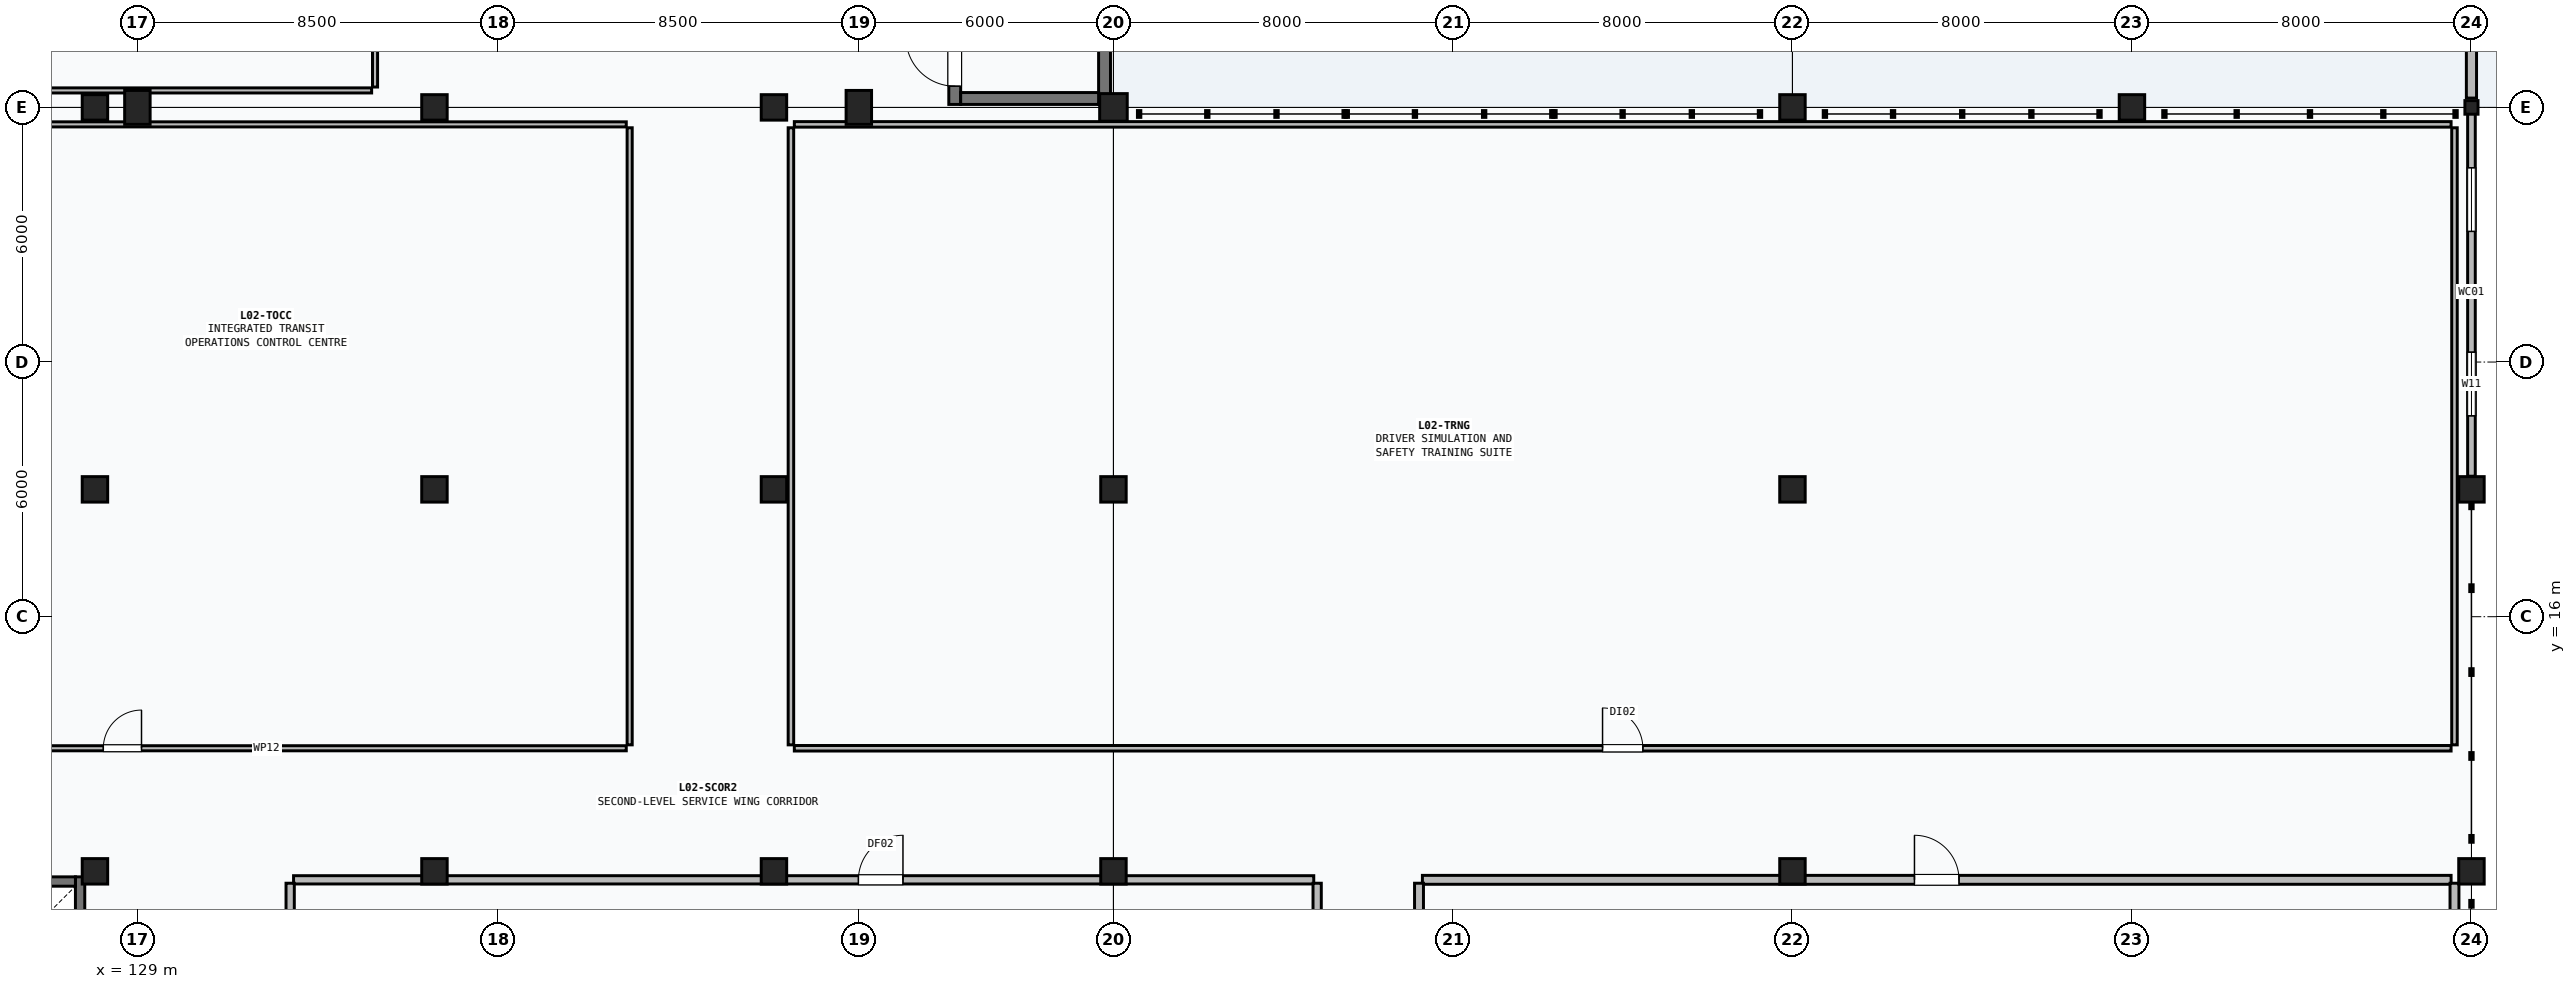
"""IFC4 building model, lengths in metres.
Left out: names, types, materials, properties, quantities, classifications, styles, units other than length and angle.
Written with IfcOpenShell. Run it as: python <this file> out.ifc"""

import sys

from ifc_helpers import new_model, si_unit, direction, frame, frame_2d, origin, origin_2d, place, context, subcontext, project, spatial, polyline, rectangle, i_section, outline, extrude, element, fill, save


model = new_model("IFC4")
c1 = context("Model", 3, precision=1e-05, world=origin(), true_north=direction((0.0, 1.0)))
c2 = subcontext(c1, "Body", "Model", "MODEL_VIEW")
j1 = project(units=[si_unit("LENGTHUNIT", "METRE"), si_unit("PLANEANGLEUNIT", "RADIAN")], contexts=[c1])
p1 = place(None, origin())
s1 = spatial("IfcSite", under=j1, at=p1, CompositionType="ELEMENT")
p2 = place(p1, origin())
s2 = spatial("IfcBuilding", under=s1, at=p2, CompositionType="ELEMENT")
p3 = place(p2, frame((0.0, 0.0, 8.4)))
s3 = spatial("IfcBuildingStorey", under=s2, at=p3, CompositionType="ELEMENT", Elevation=8.4)
for number, where, z_axis, x_axis in (
    (1, (129.0, 28.0, 0.0), (0.0, 0.0, 1.0), (1.0, 0.0, 0.0)),
    (2, (146.0, 28.0, 0.0), (0.0, 0.0, 1.0), (1.0, 0.0, 0.0)),
):
    element("IfcColumn", number, at=place(p3, frame(where, z_axis=z_axis, x_axis=x_axis)), inside=s3, PredefinedType="COLUMN", context=c2, shape_type="SweptSolid", body=[
        extrude(rectangle(XDim=0.6, YDim=0.8, at=origin_2d()), origin(), (0.0, 0.0, 1.0), 3.6),
    ])
p4 = place(p3, frame((152.0, 28.0, 0.0), z_axis=(0.0, 0.0, 1.0), x_axis=(1.0, 0.0, 0.0)))
e3 = element("IfcColumn", 3, at=p4, inside=s3, PredefinedType="COLUMN", context=c2, shape_type="SweptSolid", body=[
    extrude(rectangle(XDim=0.65, YDim=0.65, at=origin_2d()), origin(), (0.0, 0.0, 1.0), 3.6),
])
for number, where, z_axis, x_axis in (
    (4, (128.0, 10.0, 0.0), (0.0, 0.0, 1.0), (1.0, 0.0, 0.0)),
    (5, (128.0, 19.0, 0.0), (0.0, 0.0, 1.0), (1.0, 0.0, 0.0)),
    (6, (128.0, 28.0, 0.0), (0.0, 0.0, 1.0), (1.0, 0.0, 0.0)),
    (7, (136.0, 10.0, 0.0), (0.0, 0.0, 1.0), (1.0, 0.0, 0.0)),
    (8, (136.0, 19.0, 0.0), (0.0, 0.0, 1.0), (1.0, 0.0, 0.0)),
    (9, (136.0, 28.0, 0.0), (0.0, 0.0, 1.0), (1.0, 0.0, 0.0)),
    (10, (144.0, 10.0, 0.0), (0.0, 0.0, 1.0), (1.0, 0.0, 0.0)),
    (11, (144.0, 19.0, 0.0), (0.0, 0.0, 1.0), (1.0, 0.0, 0.0)),
    (12, (144.0, 28.0, 0.0), (0.0, 0.0, 1.0), (1.0, 0.0, 0.0)),
    (13, (152.0, 10.0, 0.0), (0.0, 0.0, 1.0), (1.0, 0.0, 0.0)),
    (14, (152.0, 19.0, 0.0), (0.0, 0.0, 1.0), (1.0, 0.0, 0.0)),
    (15, (168.0, 10.0, 0.0), (0.0, 0.0, 1.0), (1.0, 0.0, 0.0)),
    (16, (168.0, 19.0, 0.0), (0.0, 0.0, 1.0), (1.0, 0.0, 0.0)),
    (17, (168.0, 28.0, 0.0), (0.0, 0.0, 1.0), (1.0, 0.0, 0.0)),
    (18, (176.0, 28.0, 0.0), (0.0, 0.0, 1.0), (1.0, 0.0, 0.0)),
    (19, (184.0, 10.0, 0.0), (0.0, 0.0, 1.0), (1.0, 0.0, 0.0)),
    (20, (184.0, 19.0, 0.0), (0.0, 0.0, 1.0), (1.0, 0.0, 0.0)),
):
    element("IfcColumn", number, at=place(p3, frame(where, z_axis=z_axis, x_axis=x_axis)), inside=s3, PredefinedType="COLUMN", context=c2, shape_type="SweptSolid", body=[
        extrude(rectangle(XDim=0.6, YDim=0.6, at=origin_2d()), origin(), (0.0, 0.0, 1.0), 3.6),
    ])
p5 = place(p3, frame((184.0, 28.0, 0.0), z_axis=(0.0, 0.0, 1.0), x_axis=(1.0, 0.0, 0.0)))
e21 = element("IfcColumn", 21, at=p5, inside=s3, PredefinedType="COLUMN", context=c2, shape_type="SweptSolid", body=[
    extrude(i_section(OverallWidth=0.309, OverallDepth=0.321, WebThickness=0.014, FlangeThickness=0.022, FilletRadius=0.015, at=origin_2d()), origin(), (0.0, 0.0, 1.0), 8.15),
])
p6 = place(p3, frame((184.0, 28.22, 0.0), z_axis=(0.0, 0.0, 1.0), x_axis=(0.0, 1.0, 0.0)))
e22 = element("IfcWall", 22, at=p6, inside=s3, PredefinedType="SOLIDWALL", context=c2, shape_type="SweptSolid", body=[
    extrude(outline(polyline([(0.0, 0.0), (13.56, 0.0), (13.56, 0.22), (0.0, 8.08), (0.0, 0.0)])), frame((0.0, 0.12, 0.0), z_axis=(0.0, -1.0, 0.0), x_axis=(1.0, 0.0, 0.0)), (0.0, 0.0, 1.0), 0.24),
])
p7 = place(p3, frame((184.0, 19.31, 0.0), z_axis=(0.0, 0.0, 1.0), x_axis=(0.0, 1.0, 0.0)))
e23 = element("IfcWall", 23, at=p7, inside=s3, PredefinedType="USERDEFINED", context=c2, shape_type="SweptSolid", body=[
    extrude(rectangle(XDim=8.69, YDim=0.18, at=frame_2d((4.345, 0.0))), origin(), (0.0, 0.0, 1.0), 3.335),
])
p8 = place(p7, frame((1.423, 0.0, 0.95)))
e24 = element("IfcOpeningElement", 24, at=p8, cuts=e23, PredefinedType="OPENING", context=c2, shape_type="SweptSolid", body=[
    extrude(rectangle(XDim=1.5, YDim=1.8, at=frame_2d((0.75, 0.9))), frame((0.0, 0.1, 0.0), z_axis=(0.0, -1.0, 0.0), x_axis=(1.0, 0.0, 0.0)), (0.0, 0.0, 1.0), 0.2),
])
p9 = place(p7, frame((5.768, 0.0, 0.95)))
e25 = element("IfcOpeningElement", 25, at=p9, cuts=e23, PredefinedType="OPENING", context=c2, shape_type="SweptSolid", body=[
    extrude(rectangle(XDim=1.5, YDim=1.8, at=frame_2d((0.75, 0.9))), frame((0.0, 0.1, 0.0), z_axis=(0.0, -1.0, 0.0), x_axis=(1.0, 0.0, 0.0)), (0.0, 0.0, 1.0), 0.2),
])
p10 = place(p3, frame((148.26, 28.07, 0.0), z_axis=(0.0, 0.0, 1.0), x_axis=(0.0, 1.0, 0.0)))
e26 = element("IfcWall", 26, at=p10, inside=s3, PredefinedType="SHEAR", context=c2, shape_type="SweptSolid", body=[
    extrude(rectangle(XDim=9.86, YDim=0.28, at=frame_2d((4.93, 0.0))), origin(), (0.0, 0.0, 1.0), 3.6),
])
p11 = place(p10, frame((0.43, 0.0, 0.0)))
e27 = element("IfcOpeningElement", 27, at=p11, cuts=e26, PredefinedType="OPENING", context=c2, shape_type="SweptSolid", body=[
    extrude(rectangle(XDim=1.15, YDim=2.15, at=frame_2d((0.575, 1.075))), frame((0.0, 0.15, 0.0), z_axis=(0.0, -1.0, 0.0), x_axis=(1.0, 0.0, 0.0)), (0.0, 0.0, 1.0), 0.3),
])
p12 = place(p3, frame((151.79, 37.93, 0.0), z_axis=(0.0, 0.0, 1.0), x_axis=(0.0, -1.0, 0.0)))
e28 = element("IfcWall", 28, at=p12, inside=s3, PredefinedType="SHEAR", context=c2, shape_type="SweptSolid", body=[
    extrude(rectangle(XDim=9.86, YDim=0.28, at=frame_2d((4.93, 0.0))), origin(), (0.0, 0.0, 1.0), 3.6),
])
p13 = place(p3, frame((151.65, 28.21, 0.0), z_axis=(0.0, 0.0, 1.0), x_axis=(-1.0, 0.0, 0.0)))
e29 = element("IfcWall", 29, at=p13, inside=s3, PredefinedType="SHEAR", context=c2, shape_type="SweptSolid", body=[
    extrude(rectangle(XDim=3.25, YDim=0.28, at=frame_2d((1.625, 0.0))), origin(), (0.0, 0.0, 1.0), 3.6),
])
p14 = place(p3, frame((127.65, 9.87, 0.0), z_axis=(0.0, 0.0, 1.0), x_axis=(0.0, -1.0, 0.0)))
e30 = element("IfcWall", 30, at=p14, inside=s3, PredefinedType="SHEAR", context=c2, shape_type="SweptSolid", body=[
    extrude(rectangle(XDim=3.81, YDim=0.22, at=frame_2d((1.905, 0.0))), origin(), (0.0, 0.0, 1.0), 3.6),
])
p15 = place(p14, frame((1.205, 0.0, 0.0)))
e31 = element("IfcOpeningElement", 31, at=p15, cuts=e30, PredefinedType="OPENING", context=c2, shape_type="SweptSolid", body=[
    extrude(rectangle(XDim=1.4, YDim=2.3, at=frame_2d((0.7, 1.15))), frame((0.0, 0.12, 0.0), z_axis=(0.0, -1.0, 0.0), x_axis=(1.0, 0.0, 0.0)), (0.0, 0.0, 1.0), 0.24),
])
p16 = place(p3, frame((123.94, 9.76, 0.0), z_axis=(0.0, 0.0, 1.0), x_axis=(1.0, 0.0, 0.0)))
e32 = element("IfcWall", 32, at=p16, inside=s3, PredefinedType="SHEAR", context=c2, shape_type="SweptSolid", body=[
    extrude(rectangle(XDim=3.6, YDim=0.22, at=frame_2d((1.8, 0.0))), origin(), (0.0, 0.0, 1.0), 3.6),
])
p17 = place(p3, frame((112.48, 28.4, 0.0), z_axis=(0.0, 0.0, 1.0), x_axis=(1.0, 0.0, 0.0)))
e33 = element("IfcWall", 33, at=p17, inside=s3, PredefinedType="PARTITIONING", context=c2, shape_type="SweptSolid", body=[
    extrude(rectangle(XDim=22.04, YDim=0.12, at=frame_2d((11.02, 0.0))), origin(), (0.0, 0.0, 1.0), 2.395),
])
p18 = place(p3, frame((134.6, 28.48, 0.0), z_axis=(0.0, 0.0, 1.0), x_axis=(0.0, 1.0, 0.0)))
e34 = element("IfcWall", 34, at=p18, inside=s3, PredefinedType="PARTITIONING", context=c2, shape_type="SweptSolid", body=[
    extrude(rectangle(XDim=9.44, YDim=0.12, at=frame_2d((4.72, 0.0))), origin(), (0.0, 0.0, 1.0), 3.345),
])
p19 = place(p18, frame((3.995, 0.0, 0.0)))
e35 = element("IfcOpeningElement", 35, at=p19, cuts=e34, PredefinedType="OPENING", context=c2, shape_type="SweptSolid", body=[
    extrude(rectangle(XDim=1.45, YDim=2.2, at=frame_2d((0.725, 1.1))), frame((0.0, 0.07, 0.0), z_axis=(0.0, -1.0, 0.0), x_axis=(1.0, 0.0, 0.0)), (0.0, 0.0, 1.0), 0.14),
])
p20 = place(p3, frame((112.48, 12.9, 0.0), z_axis=(0.0, 0.0, 1.0), x_axis=(1.0, 0.0, 0.0)))
e36 = element("IfcWall", 36, at=p20, inside=s3, PredefinedType="PARTITIONING", context=c2, shape_type="SweptSolid", body=[
    extrude(rectangle(XDim=28.04, YDim=0.12, at=frame_2d((14.02, 0.0))), origin(), (0.0, 0.0, 1.0), 2.695),
])
p21 = place(p20, frame((15.717, 0.0, 0.0)))
e37 = element("IfcOpeningElement", 37, at=p21, cuts=e36, PredefinedType="OPENING", context=c2, shape_type="SweptSolid", body=[
    extrude(rectangle(XDim=0.9, YDim=2.1, at=frame_2d((0.45, 1.05))), frame((0.0, 0.07, 0.0), z_axis=(0.0, -1.0, 0.0), x_axis=(1.0, 0.0, 0.0)), (0.0, 0.0, 1.0), 0.14),
])
p22 = place(p3, frame((112.48, 27.6, 0.0), z_axis=(0.0, 0.0, 1.0), x_axis=(1.0, 0.0, 0.0)))
e38 = element("IfcWall", 38, at=p22, inside=s3, PredefinedType="PARTITIONING", context=c2, shape_type="SweptSolid", body=[
    extrude(rectangle(XDim=28.04, YDim=0.12, at=frame_2d((14.02, 0.0))), origin(), (0.0, 0.0, 1.0), 2.345),
])
p23 = place(p3, frame((140.6, 12.98, 0.0), z_axis=(0.0, 0.0, 1.0), x_axis=(0.0, 1.0, 0.0)))
e39 = element("IfcWall", 39, at=p23, inside=s3, PredefinedType="PARTITIONING", context=c2, shape_type="SweptSolid", body=[
    extrude(rectangle(XDim=14.54, YDim=0.12, at=frame_2d((7.27, 0.0))), origin(), (0.0, 0.0, 1.0), 2.345),
])
p24 = place(p3, frame((144.48, 12.9, 0.0), z_axis=(0.0, 0.0, 1.0), x_axis=(1.0, 0.0, 0.0)))
e40 = element("IfcWall", 40, at=p24, inside=s3, PredefinedType="PARTITIONING", context=c2, shape_type="SweptSolid", body=[
    extrude(rectangle(XDim=39.04, YDim=0.13, at=frame_2d((19.52, 0.0))), origin(), (0.0, 0.0, 1.0), 2.695),
])
p25 = place(p24, frame((19.045, 0.0, 0.0)))
e41 = element("IfcOpeningElement", 41, at=p25, cuts=e40, PredefinedType="OPENING", context=c2, shape_type="SweptSolid", body=[
    extrude(rectangle(XDim=0.95, YDim=2.1, at=frame_2d((0.475, 1.05))), frame((0.0, 0.075, 0.0), z_axis=(0.0, -1.0, 0.0), x_axis=(1.0, 0.0, 0.0)), (0.0, 0.0, 1.0), 0.15),
])
p26 = place(p3, frame((144.48, 27.6, 0.0), z_axis=(0.0, 0.0, 1.0), x_axis=(1.0, 0.0, 0.0)))
e42 = element("IfcWall", 42, at=p26, inside=s3, PredefinedType="PARTITIONING", context=c2, shape_type="SweptSolid", body=[
    extrude(rectangle(XDim=39.04, YDim=0.13, at=frame_2d((19.52, 0.0))), origin(), (0.0, 0.0, 1.0), 2.345),
])
p27 = place(p3, frame((144.4, 12.98, 0.0), z_axis=(0.0, 0.0, 1.0), x_axis=(0.0, 1.0, 0.0)))
e43 = element("IfcWall", 43, at=p27, inside=s3, PredefinedType="PARTITIONING", context=c2, shape_type="SweptSolid", body=[
    extrude(rectangle(XDim=14.54, YDim=0.13, at=frame_2d((7.27, 0.0))), origin(), (0.0, 0.0, 1.0), 2.495),
])
p28 = place(p3, frame((183.6, 12.98, 0.0), z_axis=(0.0, 0.0, 1.0), x_axis=(0.0, 1.0, 0.0)))
e44 = element("IfcWall", 44, at=p28, inside=s3, PredefinedType="PARTITIONING", context=c2, shape_type="SweptSolid", body=[
    extrude(rectangle(XDim=14.54, YDim=0.13, at=frame_2d((7.27, 0.0))), origin(), (0.0, 0.0, 1.0), 2.395),
])
p29 = place(p3, frame((132.68, 9.8, 0.0), z_axis=(0.0, 0.0, 1.0), x_axis=(1.0, 0.0, 0.0)))
e45 = element("IfcWall", 45, at=p29, inside=s3, PredefinedType="PARTITIONING", context=c2, shape_type="SweptSolid", body=[
    extrude(rectangle(XDim=24.04, YDim=0.195, at=frame_2d((12.02, 0.0))), origin(), (0.0, 0.0, 1.0), 2.345),
])
p30 = place(p29, frame((13.31, 0.0, 0.0)))
e46 = element("IfcOpeningElement", 46, at=p30, cuts=e45, PredefinedType="OPENING", context=c2, shape_type="SweptSolid", body=[
    extrude(rectangle(XDim=1.05, YDim=2.15, at=frame_2d((0.525, 1.075))), frame((0.0, 0.107, 0.0), z_axis=(0.0, -1.0, 0.0), x_axis=(1.0, 0.0, 0.0)), (0.0, 0.0, 1.0), 0.215),
])
p31 = place(p3, frame((132.6, 0.48, 0.0), z_axis=(0.0, 0.0, 1.0), x_axis=(0.0, 1.0, 0.0)))
e47 = element("IfcWall", 47, at=p31, inside=s3, PredefinedType="PARTITIONING", context=c2, shape_type="SweptSolid", body=[
    extrude(rectangle(XDim=9.24, YDim=0.195, at=frame_2d((4.62, 0.0))), origin(), (0.0, 0.0, 1.0), 3.345),
])
p32 = place(p3, frame((156.8, 0.48, 0.0), z_axis=(0.0, 0.0, 1.0), x_axis=(0.0, 1.0, 0.0)))
e48 = element("IfcWall", 48, at=p32, inside=s3, PredefinedType="PARTITIONING", context=c2, shape_type="SweptSolid", body=[
    extrude(rectangle(XDim=9.24, YDim=0.195, at=frame_2d((4.62, 0.0))), origin(), (0.0, 0.0, 1.0), 2.395),
])
p33 = place(p3, frame((159.28, 9.8, 0.0), z_axis=(0.0, 0.0, 1.0), x_axis=(1.0, 0.0, 0.0)))
e49 = element("IfcWall", 49, at=p33, inside=s3, PredefinedType="PARTITIONING", context=c2, shape_type="SweptSolid", body=[
    extrude(rectangle(XDim=24.24, YDim=0.21, at=frame_2d((12.12, 0.0))), origin(), (0.0, 0.0, 1.0), 2.395),
])
p34 = place(p33, frame((11.595, 0.0, 0.0)))
e50 = element("IfcOpeningElement", 50, at=p34, cuts=e49, PredefinedType="OPENING", context=c2, shape_type="SweptSolid", body=[
    extrude(rectangle(XDim=1.05, YDim=2.15, at=frame_2d((0.525, 1.075))), frame((0.0, 0.115, 0.0), z_axis=(0.0, -1.0, 0.0), x_axis=(1.0, 0.0, 0.0)), (0.0, 0.0, 1.0), 0.23),
])
for number, where, z_axis, x_axis in (
    (51, (159.2, 0.48, 0.0), (0.0, 0.0, 1.0), (0.0, 1.0, 0.0)),
    (52, (183.6, 0.48, 0.0), (0.0, 0.0, 1.0), (0.0, 1.0, 0.0)),
):
    element("IfcWall", number, at=place(p3, frame(where, z_axis=z_axis, x_axis=x_axis)), inside=s3, PredefinedType="PARTITIONING", context=c2, shape_type="SweptSolid", body=[
        extrude(rectangle(XDim=9.24, YDim=0.21, at=frame_2d((4.62, 0.0))), origin(), (0.0, 0.0, 1.0), 2.395),
    ])
p35 = place(p8, origin())
e53 = element("IfcWindow", 53, at=p35, inside=s3, PartitioningType="SINGLE_PANEL", PredefinedType="WINDOW", context=c2, shape_type="SweptSolid", body=[
    extrude(rectangle(XDim=1.5, YDim=1.8, at=frame_2d((0.75, 0.9))), frame((0.0, 0.03, 0.0), z_axis=(0.0, -1.0, 0.0), x_axis=(1.0, 0.0, 0.0)), (0.0, 0.0, 1.0), 0.06),
])
fill(e24, e53)
p36 = place(p9, origin())
e54 = element("IfcWindow", 54, at=p36, inside=s3, PartitioningType="SINGLE_PANEL", PredefinedType="WINDOW", context=c2, shape_type="SweptSolid", body=[
    extrude(rectangle(XDim=1.5, YDim=1.8, at=frame_2d((0.75, 0.9))), frame((0.0, 0.03, 0.0), z_axis=(0.0, -1.0, 0.0), x_axis=(1.0, 0.0, 0.0)), (0.0, 0.0, 1.0), 0.06),
])
fill(e25, e54)
p37 = place(p11, origin())
e55 = element("IfcDoor", 55, at=p37, inside=s3, OperationType="SINGLE_SWING_RIGHT", PredefinedType="DOOR", context=c2, shape_type="SweptSolid", body=[
    extrude(rectangle(XDim=1.15, YDim=2.15, at=frame_2d((0.575, 1.075))), frame((0.0, 0.025, 0.0), z_axis=(0.0, -1.0, 0.0), x_axis=(1.0, 0.0, 0.0)), (0.0, 0.0, 1.0), 0.05),
])
fill(e27, e55)
p38 = place(p21, origin())
e56 = element("IfcDoor", 56, at=p38, inside=s3, OperationType="SINGLE_SWING_RIGHT", PredefinedType="DOOR", context=c2, shape_type="SweptSolid", body=[
    extrude(rectangle(XDim=0.9, YDim=2.1, at=frame_2d((0.45, 1.05))), frame((0.0, 0.025, 0.0), z_axis=(0.0, -1.0, 0.0), x_axis=(1.0, 0.0, 0.0)), (0.0, 0.0, 1.0), 0.05),
])
fill(e37, e56)
p39 = place(p25, origin())
e57 = element("IfcDoor", 57, at=p39, inside=s3, OperationType="SINGLE_SWING_LEFT", PredefinedType="DOOR", context=c2, shape_type="SweptSolid", body=[
    extrude(rectangle(XDim=0.95, YDim=2.1, at=frame_2d((0.475, 1.05))), frame((0.0, 0.025, 0.0), z_axis=(0.0, -1.0, 0.0), x_axis=(1.0, 0.0, 0.0)), (0.0, 0.0, 1.0), 0.05),
])
fill(e41, e57)
p40 = place(p30, origin())
e58 = element("IfcDoor", 58, at=p40, inside=s3, OperationType="SINGLE_SWING_RIGHT", PredefinedType="DOOR", context=c2, shape_type="SweptSolid", body=[
    extrude(rectangle(XDim=1.05, YDim=2.15, at=frame_2d((0.525, 1.075))), frame((0.0, 0.025, 0.0), z_axis=(0.0, -1.0, 0.0), x_axis=(1.0, 0.0, 0.0)), (0.0, 0.0, 1.0), 0.05),
])
fill(e46, e58)
p41 = place(p34, origin())
e59 = element("IfcDoor", 59, at=p41, inside=s3, OperationType="SINGLE_SWING_LEFT", PredefinedType="DOOR", context=c2, shape_type="SweptSolid", body=[
    extrude(rectangle(XDim=1.05, YDim=2.15, at=frame_2d((0.525, 1.075))), frame((0.0, 0.025, 0.0), z_axis=(0.0, -1.0, 0.0), x_axis=(1.0, 0.0, 0.0)), (0.0, 0.0, 1.0), 0.05),
])
fill(e50, e59)
save(model, sys.argv[1])
